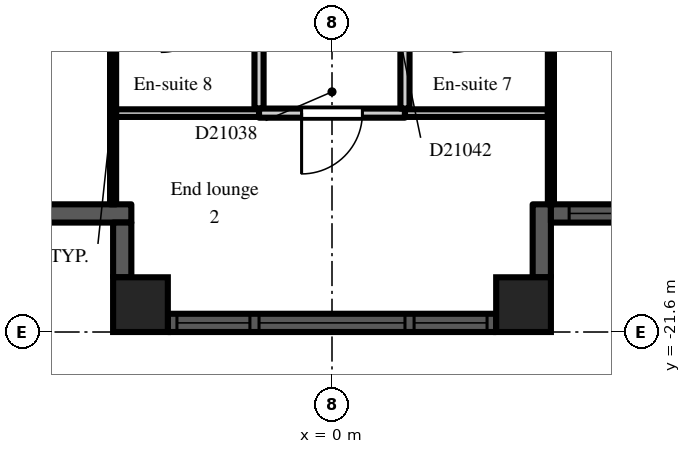
"""IFC4 building model, lengths in metres.
Left out: names, types, materials, properties, quantities, classifications, styles, units other than length and angle.
Written with IfcOpenShell. Run it as: python <this file> out.ifc"""

import sys

from ifc_helpers import new_model, si_unit, direction, frame, frame_2d, origin, origin_2d, place, context, subcontext, project, spatial, rectangle, extrude, element, fill, save


model = new_model("IFC4")
c1 = context("Model", 3, precision=1e-05, world=origin(), true_north=direction((0.0, 1.0)))
c2 = subcontext(c1, "Body", "Model", "MODEL_VIEW")
j1 = project(units=[si_unit("LENGTHUNIT", "METRE"), si_unit("PLANEANGLEUNIT", "RADIAN")], contexts=[c1])
p1 = place(None, origin())
s1 = spatial("IfcSite", under=j1, at=p1, CompositionType="ELEMENT")
p2 = place(p1, origin())
s2 = spatial("IfcBuilding", under=s1, at=p2, CompositionType="ELEMENT")
p3 = place(p2, frame((0.0, 0.0, 147.3)))
s3 = spatial("IfcBuildingStorey", under=s2, at=p3, CompositionType="ELEMENT", Elevation=147.3)
for number, where, z_axis, x_axis in (
    (1, (-3.15, -21.15, 0.0), (0.0, 0.0, 1.0), (1.0, 0.0, 0.0)),
    (2, (3.15, -21.15, 0.0), (0.0, 0.0, 1.0), (1.0, 0.0, 0.0)),
):
    element("IfcColumn", number, at=place(p3, frame(where, z_axis=z_axis, x_axis=x_axis)), inside=s3, PredefinedType="COLUMN", context=c2, shape_type="SweptSolid", body=[
        extrude(rectangle(XDim=0.9, YDim=0.9, at=origin_2d()), origin(), (0.0, 0.0, 1.0), 3.0),
    ])
p4 = place(p3, frame((-5.1, -19.65, 0.0), z_axis=(0.0, 0.0, 1.0), x_axis=(1.0, 0.0, 0.0)))
e3 = element("IfcWall", 3, at=p4, inside=s3, PredefinedType="SOLIDWALL", context=c2, shape_type="SweptSolid", body=[
    extrude(rectangle(XDim=1.8, YDim=0.3, at=frame_2d((0.9, 0.0))), origin(), (0.0, 0.0, 1.0), 2.6),
])
p5 = place(p3, frame((-3.45, -19.8, 0.0), z_axis=(0.0, 0.0, 1.0), x_axis=(0.0, -1.0, 0.0)))
e4 = element("IfcWall", 4, at=p5, inside=s3, PredefinedType="SOLIDWALL", context=c2, shape_type="SweptSolid", body=[
    extrude(rectangle(XDim=0.9, YDim=0.3, at=frame_2d((0.45, 0.0))), origin(), (0.0, 0.0, 1.0), 2.6),
])
p6 = place(p3, frame((-2.7, -21.45, 0.0), z_axis=(0.0, 0.0, 1.0), x_axis=(1.0, 0.0, 0.0)))
e5 = element("IfcWall", 5, at=p6, inside=s3, PredefinedType="SOLIDWALL", context=c2, shape_type="SweptSolid", body=[
    extrude(rectangle(XDim=5.4, YDim=0.3, at=frame_2d((2.7, 0.0))), origin(), (0.0, 0.0, 1.0), 2.2),
])
p7 = place(p6, frame((1.5, 0.0, 0.2)))
e6 = element("IfcOpeningElement", 6, at=p7, cuts=e5, PredefinedType="OPENING", context=c2, shape_type="SweptSolid", body=[
    extrude(rectangle(XDim=2.4, YDim=1.85, at=frame_2d((1.2, 0.925))), frame((0.0, 0.16, 0.0), z_axis=(0.0, -1.0, 0.0), x_axis=(1.0, 0.0, 0.0)), (0.0, 0.0, 1.0), 0.32),
])
p8 = place(p6, frame((0.15, 0.0, 0.2)))
e7 = element("IfcOpeningElement", 7, at=p8, cuts=e5, PredefinedType="OPENING", context=c2, shape_type="SweptSolid", body=[
    extrude(rectangle(XDim=1.2, YDim=1.85, at=frame_2d((0.6, 0.925))), frame((0.0, 0.16, 0.0), z_axis=(0.0, -1.0, 0.0), x_axis=(1.0, 0.0, 0.0)), (0.0, 0.0, 1.0), 0.32),
])
p9 = place(p6, frame((4.05, 0.0, 0.2)))
e8 = element("IfcOpeningElement", 8, at=p9, cuts=e5, PredefinedType="OPENING", context=c2, shape_type="SweptSolid", body=[
    extrude(rectangle(XDim=1.2, YDim=1.85, at=frame_2d((0.6, 0.925))), frame((0.0, 0.16, 0.0), z_axis=(0.0, -1.0, 0.0), x_axis=(1.0, 0.0, 0.0)), (0.0, 0.0, 1.0), 0.32),
])
p10 = place(p3, frame((3.45, -20.7, 0.0), z_axis=(0.0, 0.0, 1.0), x_axis=(0.0, 1.0, 0.0)))
e9 = element("IfcWall", 9, at=p10, inside=s3, PredefinedType="SOLIDWALL", context=c2, shape_type="SweptSolid", body=[
    extrude(rectangle(XDim=1.2, YDim=0.3, at=frame_2d((0.6, 0.0))), origin(), (0.0, 0.0, 1.0), 2.6),
])
p11 = place(p3, frame((3.6, -19.65, 0.0), z_axis=(0.0, 0.0, 1.0), x_axis=(1.0, 0.0, 0.0)))
e10 = element("IfcWall", 10, at=p11, inside=s3, PredefinedType="SOLIDWALL", context=c2, shape_type="SweptSolid", body=[
    extrude(rectangle(XDim=1.8, YDim=0.3, at=frame_2d((0.9, 0.0))), origin(), (0.0, 0.0, 1.0), 2.6),
])
p12 = place(p11, frame((0.3, 0.0, 0.2)))
e11 = element("IfcOpeningElement", 11, at=p12, cuts=e10, PredefinedType="OPENING", context=c2, shape_type="SweptSolid", body=[
    extrude(rectangle(XDim=1.2, YDim=1.85, at=frame_2d((0.6, 0.925))), frame((0.0, 0.16, 0.0), z_axis=(0.0, -1.0, 0.0), x_axis=(1.0, 0.0, 0.0)), (0.0, 0.0, 1.0), 0.32),
])
p13 = place(p3, frame((-3.6, -19.5, 0.0), z_axis=(0.0, 0.0, 1.0), x_axis=(0.0, 1.0, 0.0)))
e12 = element("IfcWall", 12, at=p13, inside=s3, PredefinedType="PARTITIONING", context=c2, shape_type="SweptSolid", body=[
    extrude(rectangle(XDim=3.35, YDim=0.1, at=frame_2d((1.675, 0.0))), origin(), (0.0, 0.0, 1.0), 2.6),
])
p14 = place(p3, frame((-3.55, -18.0, 0.0), z_axis=(0.0, 0.0, 1.0), x_axis=(1.0, 0.0, 0.0)))
e13 = element("IfcWall", 13, at=p14, inside=s3, PredefinedType="PARTITIONING", context=c2, shape_type="SweptSolid", body=[
    extrude(rectangle(XDim=2.35, YDim=0.125, at=frame_2d((1.175, 0.0))), origin(), (0.0, 0.0, 1.0), 2.6),
])
p15 = place(p3, frame((-1.2, -17.925, 0.0), z_axis=(0.0, 0.0, 1.0), x_axis=(0.0, 1.0, 0.0)))
e14 = element("IfcWall", 14, at=p15, inside=s3, PredefinedType="PARTITIONING", context=c2, shape_type="SweptSolid", body=[
    extrude(rectangle(XDim=10.65, YDim=0.15, at=frame_2d((5.325, 0.0))), origin(), (0.0, 0.0, 1.0), 2.6),
])
p16 = place(p15, frame((8.875, 0.0, 0.0)))
e15 = element("IfcOpeningElement", 15, at=p16, cuts=e14, PredefinedType="OPENING", context=c2, shape_type="SweptSolid", body=[
    extrude(rectangle(XDim=0.9, YDim=2.1, at=frame_2d((0.45, 1.05))), frame((0.0, 0.085, 0.0), z_axis=(0.0, -1.0, 0.0), x_axis=(1.0, 0.0, 0.0)), (0.0, 0.0, 1.0), 0.17),
])
p17 = place(p15, frame((5.275, 0.0, 0.0)))
e16 = element("IfcOpeningElement", 16, at=p17, cuts=e14, PredefinedType="OPENING", context=c2, shape_type="SweptSolid", body=[
    extrude(rectangle(XDim=0.9, YDim=2.1, at=frame_2d((0.45, 1.05))), frame((0.0, 0.085, 0.0), z_axis=(0.0, -1.0, 0.0), x_axis=(1.0, 0.0, 0.0)), (0.0, 0.0, 1.0), 0.17),
])
p18 = place(p15, frame((2.325, 0.0, 0.0)))
e17 = element("IfcOpeningElement", 17, at=p18, cuts=e14, PredefinedType="OPENING", context=c2, shape_type="SweptSolid", body=[
    extrude(rectangle(XDim=1.0, YDim=2.1, at=frame_2d((0.5, 1.05))), frame((0.0, 0.085, 0.0), z_axis=(0.0, -1.0, 0.0), x_axis=(1.0, 0.0, 0.0)), (0.0, 0.0, 1.0), 0.17),
])
p19 = place(p3, frame((-1.2, -18.0, 0.0), z_axis=(0.0, 0.0, 1.0), x_axis=(1.0, 0.0, 0.0)))
e18 = element("IfcWall", 18, at=p19, inside=s3, PredefinedType="PARTITIONING", context=c2, shape_type="SweptSolid", body=[
    extrude(rectangle(XDim=2.4, YDim=0.15, at=frame_2d((1.2, 0.0))), origin(), (0.0, 0.0, 1.0), 2.6),
])
p20 = place(p19, frame((0.7, 0.0, 0.0)))
e19 = element("IfcOpeningElement", 19, at=p20, cuts=e18, PredefinedType="OPENING", context=c2, shape_type="SweptSolid", body=[
    extrude(rectangle(XDim=1.0, YDim=2.1, at=frame_2d((0.5, 1.05))), frame((0.0, 0.085, 0.0), z_axis=(0.0, -1.0, 0.0), x_axis=(1.0, 0.0, 0.0)), (0.0, 0.0, 1.0), 0.17),
])
p21 = place(p3, frame((1.2, -17.925, 0.0), z_axis=(0.0, 0.0, 1.0), x_axis=(0.0, 1.0, 0.0)))
e20 = element("IfcWall", 20, at=p21, inside=s3, PredefinedType="PARTITIONING", context=c2, shape_type="SweptSolid", body=[
    extrude(rectangle(XDim=10.8, YDim=0.15, at=frame_2d((5.4, 0.0))), origin(), (0.0, 0.0, 1.0), 2.6),
])
p22 = place(p21, frame((8.875, 0.0, 0.0)))
e21 = element("IfcOpeningElement", 21, at=p22, cuts=e20, PredefinedType="OPENING", context=c2, shape_type="SweptSolid", body=[
    extrude(rectangle(XDim=0.9, YDim=2.1, at=frame_2d((0.45, 1.05))), frame((0.0, 0.085, 0.0), z_axis=(0.0, -1.0, 0.0), x_axis=(1.0, 0.0, 0.0)), (0.0, 0.0, 1.0), 0.17),
])
p23 = place(p21, frame((5.275, 0.0, 0.0)))
e22 = element("IfcOpeningElement", 22, at=p23, cuts=e20, PredefinedType="OPENING", context=c2, shape_type="SweptSolid", body=[
    extrude(rectangle(XDim=0.9, YDim=2.1, at=frame_2d((0.45, 1.05))), frame((0.0, 0.085, 0.0), z_axis=(0.0, -1.0, 0.0), x_axis=(1.0, 0.0, 0.0)), (0.0, 0.0, 1.0), 0.17),
])
p24 = place(p21, frame((1.925, 0.0, 0.0)))
e23 = element("IfcOpeningElement", 23, at=p24, cuts=e20, PredefinedType="OPENING", context=c2, shape_type="SweptSolid", body=[
    extrude(rectangle(XDim=1.0, YDim=2.1, at=frame_2d((0.5, 1.05))), frame((0.0, 0.085, 0.0), z_axis=(0.0, -1.0, 0.0), x_axis=(1.0, 0.0, 0.0)), (0.0, 0.0, 1.0), 0.17),
])
p25 = place(p3, frame((1.2, -18.0, 0.0), z_axis=(0.0, 0.0, 1.0), x_axis=(1.0, 0.0, 0.0)))
e24 = element("IfcWall", 24, at=p25, inside=s3, PredefinedType="PARTITIONING", context=c2, shape_type="SweptSolid", body=[
    extrude(rectangle(XDim=2.35, YDim=0.125, at=frame_2d((1.175, 0.0))), origin(), (0.0, 0.0, 1.0), 2.6),
])
p26 = place(p3, frame((3.6, -19.5, 0.0), z_axis=(0.0, 0.0, 1.0), x_axis=(0.0, 1.0, 0.0)))
e25 = element("IfcWall", 25, at=p26, inside=s3, PredefinedType="PARTITIONING", context=c2, shape_type="SweptSolid", body=[
    extrude(rectangle(XDim=3.25, YDim=0.1, at=frame_2d((1.625, 0.0))), origin(), (0.0, 0.0, 1.0), 2.6),
])
p27 = place(p7, origin())
e26 = element("IfcWindow", 26, at=p27, inside=s3, PartitioningType="SINGLE_PANEL", PredefinedType="WINDOW", context=c2, shape_type="SweptSolid", body=[
    extrude(rectangle(XDim=2.4, YDim=1.85, at=frame_2d((1.2, 0.925))), frame((0.0, 0.03, 0.0), z_axis=(0.0, -1.0, 0.0), x_axis=(1.0, 0.0, 0.0)), (0.0, 0.0, 1.0), 0.06),
])
fill(e6, e26)
p28 = place(p8, origin())
e27 = element("IfcWindow", 27, at=p28, inside=s3, PartitioningType="SINGLE_PANEL", PredefinedType="WINDOW", context=c2, shape_type="SweptSolid", body=[
    extrude(rectangle(XDim=1.2, YDim=1.85, at=frame_2d((0.6, 0.925))), frame((0.0, 0.03, 0.0), z_axis=(0.0, -1.0, 0.0), x_axis=(1.0, 0.0, 0.0)), (0.0, 0.0, 1.0), 0.06),
])
fill(e7, e27)
p29 = place(p9, origin())
e28 = element("IfcWindow", 28, at=p29, inside=s3, PartitioningType="SINGLE_PANEL", PredefinedType="WINDOW", context=c2, shape_type="SweptSolid", body=[
    extrude(rectangle(XDim=1.2, YDim=1.85, at=frame_2d((0.6, 0.925))), frame((0.0, 0.03, 0.0), z_axis=(0.0, -1.0, 0.0), x_axis=(1.0, 0.0, 0.0)), (0.0, 0.0, 1.0), 0.06),
])
fill(e8, e28)
p30 = place(p12, origin())
e29 = element("IfcWindow", 29, at=p30, inside=s3, PartitioningType="SINGLE_PANEL", PredefinedType="WINDOW", context=c2, shape_type="SweptSolid", body=[
    extrude(rectangle(XDim=1.2, YDim=1.85, at=frame_2d((0.6, 0.925))), frame((0.0, 0.03, 0.0), z_axis=(0.0, -1.0, 0.0), x_axis=(1.0, 0.0, 0.0)), (0.0, 0.0, 1.0), 0.06),
])
fill(e11, e29)
p31 = place(p20, frame((1.0, 0.0, 0.0), z_axis=(0.0, 0.0, 1.0), x_axis=(-1.0, 0.0, 0.0)))
e30 = element("IfcDoor", 30, at=p31, inside=s3, OperationType="SINGLE_SWING_RIGHT", PredefinedType="DOOR", context=c2, shape_type="SweptSolid", body=[
    extrude(rectangle(XDim=1.0, YDim=2.1, at=frame_2d((0.5, 1.05))), frame((0.0, 0.025, 0.0), z_axis=(0.0, -1.0, 0.0), x_axis=(1.0, 0.0, 0.0)), (0.0, 0.0, 1.0), 0.05),
])
fill(e19, e30)
save(model, sys.argv[1])
